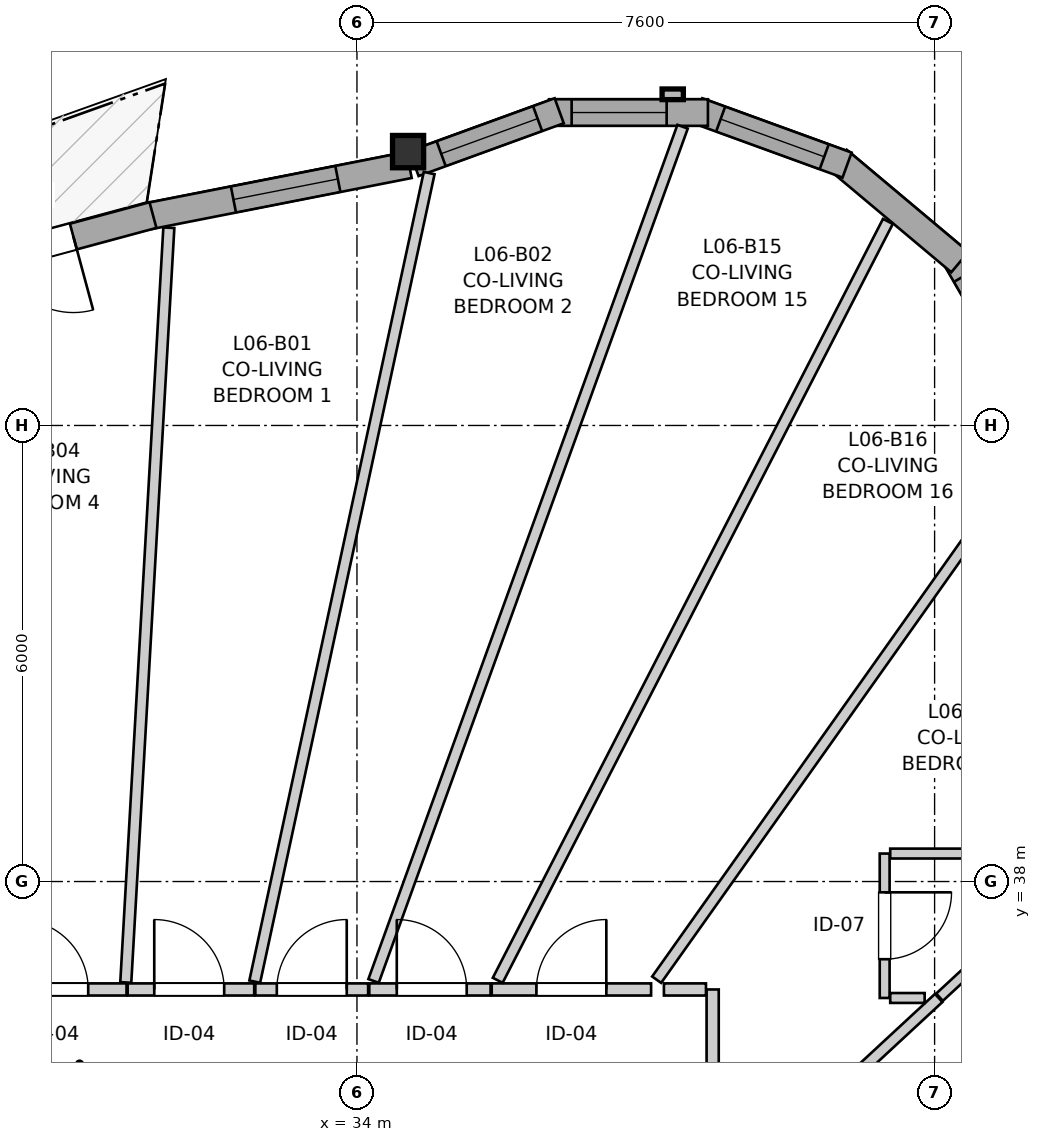
"""IFC4 building model, lengths in metres.
Left out: names, types, materials, properties, quantities, classifications, styles, units other than length and angle.
Written with IfcOpenShell. Run it as: python <this file> out.ifc"""

import sys

from ifc_helpers import new_model, si_unit, direction, frame, frame_2d, origin, origin_2d, place, context, subcontext, project, spatial, rectangle, i_section, extrude, source, transform, mapped, element, fill, save


model = new_model("IFC4")
c1 = context("Model", 3, precision=1e-05, world=origin(), true_north=direction((0.0, 1.0)))
c2 = subcontext(c1, "Body", "Model", "MODEL_VIEW")
j1 = project(units=[si_unit("LENGTHUNIT", "METRE"), si_unit("PLANEANGLEUNIT", "RADIAN")], contexts=[c1])
p1 = place(None, origin())
s1 = spatial("IfcSite", under=j1, at=p1, CompositionType="ELEMENT")
p2 = place(p1, origin())
s2 = spatial("IfcBuilding", under=s1, at=p2, CompositionType="ELEMENT")
p3 = place(p2, frame((0.0, 0.0, 23.8)))
s3 = spatial("IfcBuildingStorey", under=s2, at=p3, CompositionType="ELEMENT", Elevation=23.8)
m1 = source(origin(), c2, "Body", "SweptSolid", [
    extrude(i_section(OverallWidth=0.409, OverallDepth=0.425, WebThickness=0.03, FlangeThickness=0.048, FilletRadius=0.015, at=origin_2d()), origin(), (0.0, 0.0, 1.0), 2.935),
])
p4 = place(p3, frame((34.673, 47.603, 0.0), z_axis=(0.0, 0.0, 1.0), x_axis=(1.0, 0.0, 0.0)))
e1 = element("IfcColumn", 1, at=p4, inside=s3, PredefinedType="PILASTER", context=c2, shape_type="MappedRepresentation", body=[
    mapped(m1, transform((0.0, 0.0, 0.0), x_axis=(1.0, 0.0, 0.0), y_axis=(0.0, 1.0, 0.0), z_axis=(0.0, 0.0, 1.0), scale=1.0)),
])
p5 = place(p3, frame((42.89, 44.443, 0.0), z_axis=(0.0, 0.0, 1.0), x_axis=(-0.499995423472, 0.866028046028, 0.0)))
e2 = element("IfcWall", 2, at=p5, inside=s3, PredefinedType="SOLIDWALL", context=c2, shape_type="SweptSolid", body=[
    extrude(rectangle(XDim=2.09, YDim=0.35, at=frame_2d((1.045, 0.0))), origin(), (0.0, 0.0, 1.0), 2.415),
])
p6 = place(p5, frame((0.32, 0.0, 0.82)))
e3 = element("IfcOpeningElement", 3, at=p6, cuts=e2, PredefinedType="OPENING", context=c2, shape_type="SweptSolid", body=[
    extrude(rectangle(XDim=1.45, YDim=1.25, at=frame_2d((0.725, 0.625))), frame((0.0, 0.185, 0.0), z_axis=(0.0, -1.0, 0.0), x_axis=(1.0, 0.0, 0.0)), (0.0, 0.0, 1.0), 0.37),
])
p7 = place(p3, frame((41.932, 46.15, 0.0), z_axis=(0.0, 0.0, 1.0), x_axis=(-0.766024572719, 0.642811289563, 0.0)))
e4 = element("IfcWall", 4, at=p7, inside=s3, PredefinedType="SOLIDWALL", context=c2, shape_type="SweptSolid", body=[
    extrude(rectangle(XDim=2.09, YDim=0.35, at=frame_2d((1.045, 0.0))), origin(), (0.0, 0.0, 1.0), 2.415),
])
p8 = place(p3, frame((40.448, 47.426, 0.0), z_axis=(0.0, 0.0, 1.0), x_axis=(-0.939711556618, 0.341968113072, 0.0)))
e5 = element("IfcWall", 5, at=p8, inside=s3, PredefinedType="SOLIDWALL", context=c2, shape_type="SweptSolid", body=[
    extrude(rectangle(XDim=2.09, YDim=0.35, at=frame_2d((1.045, 0.0))), origin(), (0.0, 0.0, 1.0), 2.415),
])
p9 = place(p8, frame((0.32, 0.0, 0.82)))
e6 = element("IfcOpeningElement", 6, at=p9, cuts=e5, PredefinedType="OPENING", context=c2, shape_type="SweptSolid", body=[
    extrude(rectangle(XDim=1.45, YDim=1.25, at=frame_2d((0.725, 0.625))), frame((0.0, 0.185, 0.0), z_axis=(0.0, -1.0, 0.0), x_axis=(1.0, 0.0, 0.0)), (0.0, 0.0, 1.0), 0.37),
])
p10 = place(p3, frame((38.618, 48.117, 0.0), z_axis=(0.0, 0.0, 1.0), x_axis=(-1.0, 0.0, 0.0)))
e7 = element("IfcWall", 7, at=p10, inside=s3, PredefinedType="SOLIDWALL", context=c2, shape_type="SweptSolid", body=[
    extrude(rectangle(XDim=2.09, YDim=0.35, at=frame_2d((1.045, 0.0))), origin(), (0.0, 0.0, 1.0), 2.415),
])
p11 = place(p10, frame((0.543, 0.0, 0.82)))
e8 = element("IfcOpeningElement", 8, at=p11, cuts=e7, PredefinedType="OPENING", context=c2, shape_type="SweptSolid", body=[
    extrude(rectangle(XDim=1.25, YDim=1.35, at=frame_2d((0.625, 0.675))), frame((0.0, 0.185, 0.0), z_axis=(0.0, -1.0, 0.0), x_axis=(1.0, 0.0, 0.0)), (0.0, 0.0, 1.0), 0.37),
])
p12 = place(p3, frame((36.661, 48.14, 0.0), z_axis=(0.0, 0.0, 1.0), x_axis=(-0.939691662178, -0.342022777067, 0.0)))
e9 = element("IfcWall", 9, at=p12, inside=s3, PredefinedType="SOLIDWALL", context=c2, shape_type="SweptSolid", body=[
    extrude(rectangle(XDim=2.032, YDim=0.35, at=frame_2d((1.016, 0.0))), origin(), (0.0, 0.0, 1.0), 2.415),
])
p13 = place(p12, frame((0.302, 0.0, 0.82)))
e10 = element("IfcOpeningElement", 10, at=p13, cuts=e9, PredefinedType="OPENING", context=c2, shape_type="SweptSolid", body=[
    extrude(rectangle(XDim=1.35, YDim=1.45, at=frame_2d((0.675, 0.725))), frame((0.0, 0.185, 0.0), z_axis=(0.0, -1.0, 0.0), x_axis=(1.0, 0.0, 0.0)), (0.0, 0.0, 1.0), 0.37),
])
p14 = place(p3, frame((34.687, 47.427, 0.0), z_axis=(0.0, 0.0, 1.0), x_axis=(-0.981220485855, -0.192889497219, 0.0)))
e11 = element("IfcWall", 11, at=p14, inside=s3, PredefinedType="SOLIDWALL", context=c2, shape_type="SweptSolid", body=[
    extrude(rectangle(XDim=3.522, YDim=0.35, at=frame_2d((1.761, 0.0))), origin(), (0.0, 0.0, 1.0), 2.415),
])
p15 = place(p14, frame((0.956, 0.0, 0.82)))
e12 = element("IfcOpeningElement", 12, at=p15, cuts=e11, PredefinedType="OPENING", context=c2, shape_type="SweptSolid", body=[
    extrude(rectangle(XDim=1.4, YDim=1.35, at=frame_2d((0.7, 0.675))), frame((0.0, 0.185, 0.0), z_axis=(0.0, -1.0, 0.0), x_axis=(1.0, 0.0, 0.0)), (0.0, 0.0, 1.0), 0.37),
])
p16 = place(p3, frame((31.316, 46.768, 0.0), z_axis=(0.0, 0.0, 1.0), x_axis=(-0.965446721184, -0.260600515261, 0.0)))
e13 = element("IfcWall", 13, at=p16, inside=s3, PredefinedType="SOLIDWALL", context=c2, shape_type="SweptSolid", body=[
    extrude(rectangle(XDim=3.169, YDim=0.35, at=frame_2d((1.585, 0.0))), origin(), (0.0, 0.0, 1.0), 2.415),
])
p17 = place(p16, frame((1.085, 0.0, 0.0)))
e14 = element("IfcOpeningElement", 14, at=p17, cuts=e13, PredefinedType="OPENING", context=c2, shape_type="SweptSolid", body=[
    extrude(rectangle(XDim=1.0, YDim=2.1, at=frame_2d((0.5, 1.05))), frame((0.0, 0.185, 0.0), z_axis=(0.0, -1.0, 0.0), x_axis=(1.0, 0.0, 0.0)), (0.0, 0.0, 1.0), 0.37),
])
p18 = place(p3, frame((38.68, 36.58, 0.0), z_axis=(0.0, 0.0, 1.0), x_axis=(0.0, -1.0, 0.0)))
e15 = element("IfcWall", 15, at=p18, inside=s3, PredefinedType="PARTITIONING", context=c2, shape_type="SweptSolid", body=[
    extrude(rectangle(XDim=2.83, YDim=0.16, at=frame_2d((1.415, 0.0))), origin(), (0.0, 0.0, 1.0), 2.935),
])
p19 = place(p18, frame((0.973, 0.0, 0.0)))
e16 = element("IfcOpeningElement", 16, at=p19, cuts=e15, PredefinedType="OPENING", context=c2, shape_type="SweptSolid", body=[
    extrude(rectangle(XDim=0.92, YDim=2.1, at=frame_2d((0.46, 1.05))), frame((0.0, 0.09, 0.0), z_axis=(0.0, -1.0, 0.0), x_axis=(1.0, 0.0, 0.0)), (0.0, 0.0, 1.0), 0.18),
])
p20 = place(p3, frame((35.773, 36.58, 0.0), z_axis=(0.0, 0.0, 1.0), x_axis=(1.0, 0.0, 0.0)))
e17 = element("IfcWall", 17, at=p20, inside=s3, PredefinedType="PARTITIONING", context=c2, shape_type="SweptSolid", body=[
    extrude(rectangle(XDim=2.097, YDim=0.16, at=frame_2d((1.049, 0.0))), origin(), (0.0, 0.0, 1.0), 2.935),
])
p21 = place(p20, frame((0.588, 0.0, 0.0)))
e18 = element("IfcOpeningElement", 18, at=p21, cuts=e17, PredefinedType="OPENING", context=c2, shape_type="SweptSolid", body=[
    extrude(rectangle(XDim=0.92, YDim=2.1, at=frame_2d((0.46, 1.05))), frame((0.0, 0.09, 0.0), z_axis=(0.0, -1.0, 0.0), x_axis=(1.0, 0.0, 0.0)), (0.0, 0.0, 1.0), 0.18),
])
p22 = place(p3, frame((40.943, 38.368, 0.0), z_axis=(0.0, 0.0, 1.0), x_axis=(0.0, -1.0, 0.0)))
e19 = element("IfcWall", 19, at=p22, inside=s3, PredefinedType="PARTITIONING", context=c2, shape_type="SweptSolid", body=[
    extrude(rectangle(XDim=1.9, YDim=0.13, at=frame_2d((0.95, 0.0))), origin(), (0.0, 0.0, 1.0), 2.935),
])
p23 = place(p22, frame((0.51, 0.0, 0.0)))
e20 = element("IfcOpeningElement", 20, at=p23, cuts=e19, PredefinedType="OPENING", context=c2, shape_type="SweptSolid", body=[
    extrude(rectangle(XDim=0.88, YDim=2.05, at=frame_2d((0.44, 1.025))), frame((0.0, 0.075, 0.0), z_axis=(0.0, -1.0, 0.0), x_axis=(1.0, 0.0, 0.0)), (0.0, 0.0, 1.0), 0.15),
])
p24 = place(p3, frame((29.086, 36.58, 0.0), z_axis=(0.0, 0.0, 1.0), x_axis=(1.0, 0.0, 0.0)))
e21 = element("IfcWall", 21, at=p24, inside=s3, PredefinedType="PARTITIONING", context=c2, shape_type="SweptSolid", body=[
    extrude(rectangle(XDim=1.882, YDim=0.16, at=frame_2d((0.941, 0.0))), origin(), (0.0, 0.0, 1.0), 2.935),
])
p25 = place(p24, frame((0.458, 0.0, 0.0)))
e22 = element("IfcOpeningElement", 22, at=p25, cuts=e21, PredefinedType="OPENING", context=c2, shape_type="SweptSolid", body=[
    extrude(rectangle(XDim=0.92, YDim=2.1, at=frame_2d((0.46, 1.05))), frame((0.0, 0.09, 0.0), z_axis=(0.0, -1.0, 0.0), x_axis=(1.0, 0.0, 0.0)), (0.0, 0.0, 1.0), 0.18),
])
p26 = place(p3, frame((30.983, 36.58, 0.0), z_axis=(0.0, 0.0, 1.0), x_axis=(1.0, 0.0, 0.0)))
e23 = element("IfcWall", 23, at=p26, inside=s3, PredefinedType="PARTITIONING", context=c2, shape_type="SweptSolid", body=[
    extrude(rectangle(XDim=1.665, YDim=0.16, at=frame_2d((0.833, 0.0))), origin(), (0.0, 0.0, 1.0), 2.935),
])
p27 = place(p26, frame((0.35, 0.0, 0.0)))
e24 = element("IfcOpeningElement", 24, at=p27, cuts=e23, PredefinedType="OPENING", context=c2, shape_type="SweptSolid", body=[
    extrude(rectangle(XDim=0.92, YDim=2.1, at=frame_2d((0.46, 1.05))), frame((0.0, 0.09, 0.0), z_axis=(0.0, -1.0, 0.0), x_axis=(1.0, 0.0, 0.0)), (0.0, 0.0, 1.0), 0.18),
])
p28 = place(p3, frame((34.162, 36.58, 0.0), z_axis=(0.0, 0.0, 1.0), x_axis=(1.0, 0.0, 0.0)))
e25 = element("IfcWall", 25, at=p28, inside=s3, PredefinedType="PARTITIONING", context=c2, shape_type="SweptSolid", body=[
    extrude(rectangle(XDim=1.596, YDim=0.16, at=frame_2d((0.798, 0.0))), origin(), (0.0, 0.0, 1.0), 2.935),
])
p29 = place(p28, frame((0.362, 0.0, 0.0)))
e26 = element("IfcOpeningElement", 26, at=p29, cuts=e25, PredefinedType="OPENING", context=c2, shape_type="SweptSolid", body=[
    extrude(rectangle(XDim=0.92, YDim=2.1, at=frame_2d((0.46, 1.05))), frame((0.0, 0.09, 0.0), z_axis=(0.0, -1.0, 0.0), x_axis=(1.0, 0.0, 0.0)), (0.0, 0.0, 1.0), 0.18),
])
p30 = place(p3, frame((32.663, 36.58, 0.0), z_axis=(0.0, 0.0, 1.0), x_axis=(1.0, 0.0, 0.0)))
e27 = element("IfcWall", 27, at=p30, inside=s3, PredefinedType="PARTITIONING", context=c2, shape_type="SweptSolid", body=[
    extrude(rectangle(XDim=1.484, YDim=0.16, at=frame_2d((0.742, 0.0))), origin(), (0.0, 0.0, 1.0), 2.935),
])
p31 = place(p30, frame((0.282, 0.0, 0.0)))
e28 = element("IfcOpeningElement", 28, at=p31, cuts=e27, PredefinedType="OPENING", context=c2, shape_type="SweptSolid", body=[
    extrude(rectangle(XDim=0.92, YDim=2.1, at=frame_2d((0.46, 1.05))), frame((0.0, 0.09, 0.0), z_axis=(0.0, -1.0, 0.0), x_axis=(1.0, 0.0, 0.0)), (0.0, 0.0, 1.0), 0.18),
])
p32 = place(p3, frame((34.219, 36.692, 0.0), z_axis=(0.0, 0.0, 1.0), x_axis=(0.340186046968, 0.940358151689, 0.0)))
e29 = element("IfcWall", 29, at=p32, inside=s3, PredefinedType="PARTITIONING", context=c2, shape_type="SweptSolid", body=[
    extrude(rectangle(XDim=11.951, YDim=0.145, at=frame_2d((5.976, 0.0))), origin(), (0.0, 0.0, 1.0), 2.935),
])
p33 = place(p3, frame((35.852, 36.7, 0.0), z_axis=(0.0, 0.0, 1.0), x_axis=(0.457258091214, 0.889334041865, 0.0)))
e30 = element("IfcWall", 30, at=p33, inside=s3, PredefinedType="PARTITIONING", context=c2, shape_type="SweptSolid", body=[
    extrude(rectangle(XDim=11.227, YDim=0.145, at=frame_2d((5.613, 0.0))), origin(), (0.0, 0.0, 1.0), 2.935),
])
p34 = place(p3, frame((32.655, 36.683, 0.0), z_axis=(0.0, 0.0, 1.0), x_axis=(0.210861831441, 0.977515876107, 0.0)))
e31 = element("IfcWall", 31, at=p34, inside=s3, PredefinedType="PARTITIONING", context=c2, shape_type="SweptSolid", body=[
    extrude(rectangle(XDim=10.882, YDim=0.145, at=frame_2d((5.441, 0.0))), origin(), (0.0, 0.0, 1.0), 2.935),
])
p35 = place(p3, frame((30.958, 36.672, 0.0), z_axis=(0.0, 0.0, 1.0), x_axis=(0.056976385457, 0.998375526293, 0.0)))
e32 = element("IfcWall", 32, at=p35, inside=s3, PredefinedType="PARTITIONING", context=c2, shape_type="SweptSolid", body=[
    extrude(rectangle(XDim=9.945, YDim=0.145, at=frame_2d((4.973, 0.0))), origin(), (0.0, 0.0, 1.0), 2.935),
])
p36 = place(p3, frame((37.943, 36.708, 0.0), z_axis=(0.0, 0.0, 1.0), x_axis=(0.578429476704, 0.81573239514, 0.0)))
e33 = element("IfcWall", 33, at=p36, inside=s3, PredefinedType="PARTITIONING", context=c2, shape_type="SweptSolid", body=[
    extrude(rectangle(XDim=8.447, YDim=0.145, at=frame_2d((4.223, 0.0))), origin(), (0.0, 0.0, 1.0), 2.935),
])
p37 = place(p3, frame((38.815, 33.839, 0.0), z_axis=(0.0, 0.0, 1.0), x_axis=(0.733718730688, 0.67945332749, 0.0)))
e34 = element("IfcWall", 34, at=p37, inside=s3, PredefinedType="PARTITIONING", context=c2, shape_type="SweptSolid", body=[
    extrude(rectangle(XDim=3.869, YDim=0.145, at=frame_2d((1.935, 0.0))), origin(), (0.0, 0.0, 1.0), 2.935),
])
p38 = place(p3, frame((41.016, 38.368, 0.0), z_axis=(0.0, 0.0, 1.0), x_axis=(1.0, 0.0, 0.0)))
e35 = element("IfcWall", 35, at=p38, inside=s3, PredefinedType="PARTITIONING", context=c2, shape_type="SweptSolid", body=[
    extrude(rectangle(XDim=1.727, YDim=0.13, at=frame_2d((0.863, 0.0))), origin(), (0.0, 0.0, 1.0), 2.935),
])
p39 = place(p3, frame((41.665, 36.478, 0.0), z_axis=(0.0, 0.0, 1.0), x_axis=(0.733534386117, 0.679652340821, 0.0)))
e36 = element("IfcWall", 36, at=p39, inside=s3, PredefinedType="PARTITIONING", context=c2, shape_type="SweptSolid", body=[
    extrude(rectangle(XDim=1.454, YDim=0.13, at=frame_2d((0.727, 0.0))), origin(), (0.0, 0.0, 1.0), 2.935),
])
p40 = place(p3, frame((38.039, 36.58, 0.0), z_axis=(0.0, 0.0, 1.0), x_axis=(1.0, 0.0, 0.0)))
e37 = element("IfcWall", 37, at=p40, inside=s3, PredefinedType="PARTITIONING", context=c2, shape_type="SweptSolid", body=[
    extrude(rectangle(XDim=0.553, YDim=0.16, at=frame_2d((0.277, 0.0))), origin(), (0.0, 0.0, 1.0), 2.935),
])
p41 = place(p3, frame((41.016, 36.468, 0.0), z_axis=(0.0, 0.0, 1.0), x_axis=(1.0, 0.0, 0.0)))
e38 = element("IfcWall", 38, at=p41, inside=s3, PredefinedType="PARTITIONING", context=c2, shape_type="SweptSolid", body=[
    extrude(rectangle(XDim=0.453, YDim=0.13, at=frame_2d((0.227, 0.0))), origin(), (0.0, 0.0, 1.0), 2.935),
])
m2 = source(origin(), c2, "Body", "SweptSolid", [
    extrude(rectangle(XDim=1.45, YDim=1.25, at=frame_2d((0.725, 0.625))), frame((0.0, 0.03, 0.0), z_axis=(0.0, -1.0, 0.0), x_axis=(1.0, 0.0, 0.0)), (0.0, 0.0, 1.0), 0.06),
])
p42 = place(p9, origin())
e39 = element("IfcWindow", 39, at=p42, inside=s3, PartitioningType="SINGLE_PANEL", PredefinedType="WINDOW", context=c2, shape_type="MappedRepresentation", body=[
    mapped(m2, transform((0.0, 0.0, 0.0), x_axis=(1.0, 0.0, 0.0), y_axis=(0.0, 1.0, 0.0), z_axis=(0.0, 0.0, 1.0), scale=1.0)),
])
fill(e6, e39)
m3 = source(origin(), c2, "Body", "SweptSolid", [
    extrude(rectangle(XDim=1.25, YDim=1.35, at=frame_2d((0.625, 0.675))), frame((0.0, 0.03, 0.0), z_axis=(0.0, -1.0, 0.0), x_axis=(1.0, 0.0, 0.0)), (0.0, 0.0, 1.0), 0.06),
])
p43 = place(p11, origin())
e40 = element("IfcWindow", 40, at=p43, inside=s3, PartitioningType="SINGLE_PANEL", PredefinedType="WINDOW", context=c2, shape_type="MappedRepresentation", body=[
    mapped(m3, transform((0.0, 0.0, 0.0), x_axis=(1.0, 0.0, 0.0), y_axis=(0.0, 1.0, 0.0), z_axis=(0.0, 0.0, 1.0), scale=1.0)),
])
fill(e8, e40)
m4 = source(origin(), c2, "Body", "SweptSolid", [
    extrude(rectangle(XDim=1.35, YDim=1.45, at=frame_2d((0.675, 0.725))), frame((0.0, 0.03, 0.0), z_axis=(0.0, -1.0, 0.0), x_axis=(1.0, 0.0, 0.0)), (0.0, 0.0, 1.0), 0.06),
])
p44 = place(p13, origin())
e41 = element("IfcWindow", 41, at=p44, inside=s3, PartitioningType="SINGLE_PANEL", PredefinedType="WINDOW", context=c2, shape_type="MappedRepresentation", body=[
    mapped(m4, transform((0.0, 0.0, 0.0), x_axis=(1.0, 0.0, 0.0), y_axis=(0.0, 1.0, 0.0), z_axis=(0.0, 0.0, 1.0), scale=1.0)),
])
fill(e10, e41)
m5 = source(origin(), c2, "Body", "SweptSolid", [
    extrude(rectangle(XDim=1.4, YDim=1.35, at=frame_2d((0.7, 0.675))), frame((0.0, 0.03, 0.0), z_axis=(0.0, -1.0, 0.0), x_axis=(1.0, 0.0, 0.0)), (0.0, 0.0, 1.0), 0.06),
])
p45 = place(p15, origin())
e42 = element("IfcWindow", 42, at=p45, inside=s3, PartitioningType="SINGLE_PANEL", PredefinedType="WINDOW", context=c2, shape_type="MappedRepresentation", body=[
    mapped(m5, transform((0.0, 0.0, 0.0), x_axis=(1.0, 0.0, 0.0), y_axis=(0.0, 1.0, 0.0), z_axis=(0.0, 0.0, 1.0), scale=1.0)),
])
fill(e12, e42)
m6 = source(origin(), c2, "Body", "SweptSolid", [
    extrude(rectangle(XDim=1.0, YDim=2.1, at=frame_2d((0.5, 1.05))), frame((0.0, 0.025, 0.0), z_axis=(0.0, -1.0, 0.0), x_axis=(1.0, 0.0, 0.0)), (0.0, 0.0, 1.0), 0.05),
])
p46 = place(p17, origin())
e43 = element("IfcDoor", 43, at=p46, inside=s3, OperationType="SINGLE_SWING_LEFT", PredefinedType="DOOR", context=c2, shape_type="MappedRepresentation", body=[
    mapped(m6, transform((0.0, 0.0, 0.0), x_axis=(1.0, 0.0, 0.0), y_axis=(0.0, 1.0, 0.0), z_axis=(0.0, 0.0, 1.0), scale=1.0)),
])
fill(e14, e43)
m7 = source(origin(), c2, "Body", "SweptSolid", [
    extrude(rectangle(XDim=0.92, YDim=2.1, at=frame_2d((0.46, 1.05))), frame((0.0, 0.025, 0.0), z_axis=(0.0, -1.0, 0.0), x_axis=(1.0, 0.0, 0.0)), (0.0, 0.0, 1.0), 0.05),
])
p47 = place(p21, origin())
e44 = element("IfcDoor", 44, at=p47, inside=s3, OperationType="SINGLE_SWING_RIGHT", PredefinedType="DOOR", context=c2, shape_type="MappedRepresentation", body=[
    mapped(m7, transform((0.0, 0.0, 0.0), x_axis=(1.0, 0.0, 0.0), y_axis=(0.0, 1.0, 0.0), z_axis=(0.0, 0.0, 1.0), scale=1.0)),
])
fill(e18, e44)
m8 = source(origin(), c2, "Body", "SweptSolid", [
    extrude(rectangle(XDim=0.88, YDim=2.05, at=frame_2d((0.44, 1.025))), frame((0.0, 0.025, 0.0), z_axis=(0.0, -1.0, 0.0), x_axis=(1.0, 0.0, 0.0)), (0.0, 0.0, 1.0), 0.05),
])
p48 = place(p23, origin())
e45 = element("IfcDoor", 45, at=p48, inside=s3, OperationType="SINGLE_SWING_LEFT", PredefinedType="DOOR", context=c2, shape_type="MappedRepresentation", body=[
    mapped(m8, transform((0.0, 0.0, 0.0), x_axis=(1.0, 0.0, 0.0), y_axis=(0.0, 1.0, 0.0), z_axis=(0.0, 0.0, 1.0), scale=1.0)),
])
fill(e20, e45)
p49 = place(p25, origin())
e46 = element("IfcDoor", 46, at=p49, inside=s3, OperationType="SINGLE_SWING_LEFT", PredefinedType="DOOR", context=c2, shape_type="MappedRepresentation", body=[
    mapped(m7, transform((0.0, 0.0, 0.0), x_axis=(1.0, 0.0, 0.0), y_axis=(0.0, 1.0, 0.0), z_axis=(0.0, 0.0, 1.0), scale=1.0)),
])
fill(e22, e46)
p50 = place(p27, origin())
e47 = element("IfcDoor", 47, at=p50, inside=s3, OperationType="SINGLE_SWING_LEFT", PredefinedType="DOOR", context=c2, shape_type="MappedRepresentation", body=[
    mapped(m7, transform((0.0, 0.0, 0.0), x_axis=(1.0, 0.0, 0.0), y_axis=(0.0, 1.0, 0.0), z_axis=(0.0, 0.0, 1.0), scale=1.0)),
])
fill(e24, e47)
p51 = place(p29, origin())
e48 = element("IfcDoor", 48, at=p51, inside=s3, OperationType="SINGLE_SWING_LEFT", PredefinedType="DOOR", context=c2, shape_type="MappedRepresentation", body=[
    mapped(m7, transform((0.0, 0.0, 0.0), x_axis=(1.0, 0.0, 0.0), y_axis=(0.0, 1.0, 0.0), z_axis=(0.0, 0.0, 1.0), scale=1.0)),
])
fill(e26, e48)
p52 = place(p31, origin())
e49 = element("IfcDoor", 49, at=p52, inside=s3, OperationType="SINGLE_SWING_RIGHT", PredefinedType="DOOR", context=c2, shape_type="MappedRepresentation", body=[
    mapped(m7, transform((0.0, 0.0, 0.0), x_axis=(1.0, 0.0, 0.0), y_axis=(0.0, 1.0, 0.0), z_axis=(0.0, 0.0, 1.0), scale=1.0)),
])
fill(e28, e49)
save(model, sys.argv[1])
